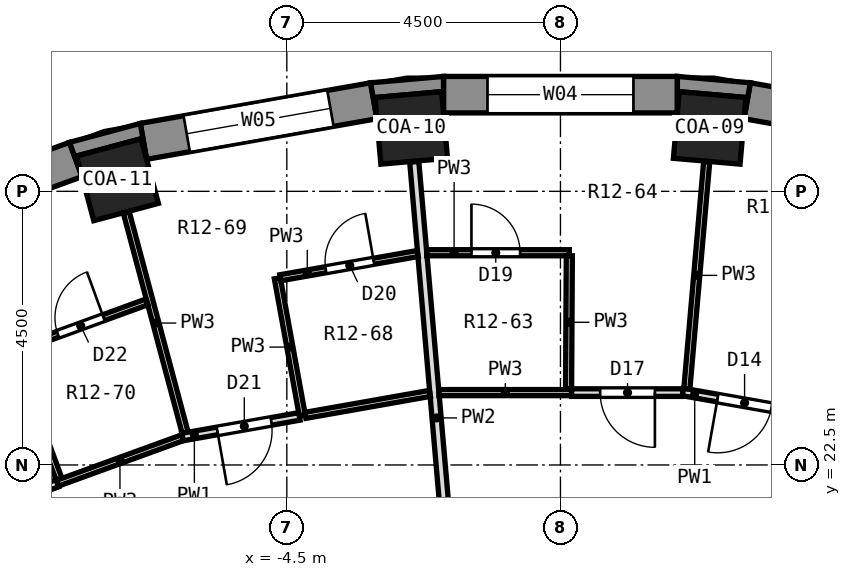
"""IFC4 building model, lengths in metres.
Left out: names, types, materials, properties, quantities, classifications, styles, units other than length and angle.
Written with IfcOpenShell. Run it as: python <this file> out.ifc"""

import sys

from ifc_helpers import new_model, si_unit, direction, frame, frame_2d, origin, origin_2d, place, context, subcontext, project, spatial, polyline, rectangle, outline, extrude, element, fill, save


model = new_model("IFC4")
c1 = context("Model", 3, precision=1e-05, world=origin(), true_north=direction((0.0, 1.0)))
c2 = subcontext(c1, "Body", "Model", "MODEL_VIEW")
j1 = project(units=[si_unit("LENGTHUNIT", "METRE"), si_unit("PLANEANGLEUNIT", "RADIAN")], contexts=[c1])
p1 = place(None, origin())
s1 = spatial("IfcSite", under=j1, at=p1, CompositionType="ELEMENT")
p2 = place(p1, origin())
s2 = spatial("IfcBuilding", under=s1, at=p2, CompositionType="ELEMENT")
p3 = place(p2, frame((0.0, 0.0, 56.0)))
s3 = spatial("IfcBuildingStorey", under=s2, at=p3, CompositionType="ELEMENT", Elevation=56.0)
for number, where, z_axis, x_axis in (
    (1, (2.453, 28.043, 0.0), (0.0, 0.0, 1.0), (0.087, 0.996, 0.0)),
    (2, (-2.453, 28.043, 0.0), (0.0, 0.0, 1.0), (-0.087, 0.996, 0.0)),
    (3, (-7.286, 27.191, 0.0), (0.0, 0.0, 1.0), (-0.259, 0.966, 0.0)),
):
    element("IfcColumn", number, at=place(p3, frame(where, z_axis=z_axis, x_axis=x_axis)), inside=s3, PredefinedType="COLUMN", context=c2, shape_type="SweptSolid", body=[
        extrude(rectangle(XDim=1.1, YDim=1.1, at=origin_2d()), origin(), (0.0, 0.0, 1.0), 3.3),
    ])
p4 = place(p3, frame((6.858, 27.821, 0.0), z_axis=(0.0, 0.0, 1.0), x_axis=(-0.984800809218, 0.173687553279, 0.0)))
e4 = element("IfcWall", 4, at=p4, inside=s3, PredefinedType="SOLIDWALL", context=c2, shape_type="SweptSolid", body=[
    extrude(rectangle(XDim=3.846, YDim=0.6, at=frame_2d((1.923, 0.0))), origin(), (0.0, 0.0, 1.0), 2.75),
])
p5 = place(p4, frame((0.723, 0.0, 0.9)))
e5 = element("IfcOpeningElement", 5, at=p5, cuts=e4, PredefinedType="OPENING", context=c2, shape_type="SweptSolid", body=[
    extrude(rectangle(XDim=2.4, YDim=1.8, at=frame_2d((1.2, 0.9))), frame((0.0, 0.312, 0.0), z_axis=(0.0, -1.0, 0.0), x_axis=(1.0, 0.0, 0.0)), (0.0, 0.0, 1.0), 0.624),
])
p6 = place(p3, frame((1.923, 28.59, 0.0), z_axis=(0.0, 0.0, 1.0), x_axis=(-1.0, 0.0, 0.0)))
e6 = element("IfcWall", 6, at=p6, inside=s3, PredefinedType="SOLIDWALL", context=c2, shape_type="SweptSolid", body=[
    extrude(rectangle(XDim=3.846, YDim=0.6, at=frame_2d((1.923, 0.0))), origin(), (0.0, 0.0, 1.0), 2.75),
])
p7 = place(p6, frame((0.723, 0.0, 0.9)))
e7 = element("IfcOpeningElement", 7, at=p7, cuts=e6, PredefinedType="OPENING", context=c2, shape_type="SweptSolid", body=[
    extrude(rectangle(XDim=2.4, YDim=1.8, at=frame_2d((1.2, 0.9))), frame((0.0, 0.312, 0.0), z_axis=(0.0, -1.0, 0.0), x_axis=(1.0, 0.0, 0.0)), (0.0, 0.0, 1.0), 0.624),
])
p8 = place(p3, frame((-3.071, 28.489, 0.0), z_axis=(0.0, 0.0, 1.0), x_axis=(-0.984800809218, -0.173687553279, 0.0)))
e8 = element("IfcWall", 8, at=p8, inside=s3, PredefinedType="SOLIDWALL", context=c2, shape_type="SweptSolid", body=[
    extrude(rectangle(XDim=3.846, YDim=0.6, at=frame_2d((1.923, 0.0))), origin(), (0.0, 0.0, 1.0), 2.75),
])
p9 = place(p8, frame((0.723, 0.0, 0.9)))
e9 = element("IfcOpeningElement", 9, at=p9, cuts=e8, PredefinedType="OPENING", context=c2, shape_type="SweptSolid", body=[
    extrude(rectangle(XDim=2.4, YDim=1.8, at=frame_2d((1.2, 0.9))), frame((0.0, 0.312, 0.0), z_axis=(0.0, -1.0, 0.0), x_axis=(1.0, 0.0, 0.0)), (0.0, 0.0, 1.0), 0.624),
])
p10 = place(p3, frame((-7.971, 27.523, 0.0), z_axis=(0.0, 0.0, 1.0), x_axis=(-0.939689588564, -0.342028474173, 0.0)))
e10 = element("IfcWall", 10, at=p10, inside=s3, PredefinedType="SOLIDWALL", context=c2, shape_type="SweptSolid", body=[
    extrude(rectangle(XDim=3.846, YDim=0.6, at=frame_2d((1.923, 0.0))), origin(), (0.0, 0.0, 1.0), 2.75),
])
p11 = place(p10, frame((0.723, 0.0, 0.9)))
e11 = element("IfcOpeningElement", 11, at=p11, cuts=e10, PredefinedType="OPENING", context=c2, shape_type="SweptSolid", body=[
    extrude(rectangle(XDim=2.4, YDim=1.8, at=frame_2d((1.2, 0.9))), frame((0.0, 0.312, 0.0), z_axis=(0.0, -1.0, 0.0), x_axis=(1.0, 0.0, 0.0)), (0.0, 0.0, 1.0), 0.624),
])
p12 = place(p3, origin())
e12 = element("IfcWall", 12, at=p12, inside=s3, PredefinedType="SOLIDWALL", context=c2, shape_type="SweptSolid", body=[
    extrude(outline(polyline([(3.123, 28.785), (1.923, 28.89), (1.923, 28.29), (1.954, 28.639), (3.049, 28.543), (3.019, 28.194), (3.123, 28.785)])), origin(), (0.0, 0.0, 1.0), 2.75),
])
p13 = place(p3, origin())
e13 = element("IfcWall", 13, at=p13, inside=s3, PredefinedType="SOLIDWALL", context=c2, shape_type="SweptSolid", body=[
    extrude(outline(polyline([(-1.923, 28.89), (-3.123, 28.785), (-3.019, 28.194), (-3.049, 28.543), (-1.954, 28.639), (-1.923, 28.29), (-1.923, 28.89)])), origin(), (0.0, 0.0, 1.0), 2.75),
])
p14 = place(p3, origin())
e14 = element("IfcWall", 14, at=p14, inside=s3, PredefinedType="SOLIDWALL", context=c2, shape_type="SweptSolid", body=[
    extrude(outline(polyline([(-6.91, 28.117), (-8.074, 27.805), (-7.869, 27.241), (-7.959, 27.58), (-6.897, 27.865), (-6.806, 27.526), (-6.91, 28.117)])), origin(), (0.0, 0.0, 1.0), 2.75),
])
p15 = place(p3, frame((-2.405, 27.485, 0.0), z_axis=(0.0, 0.0, 1.0), x_axis=(0.086942360441, -0.996213343597, 0.0)))
e15 = element("IfcWall", 15, at=p15, inside=s3, PredefinedType="PARTITIONING", context=c2, shape_type="SweptSolid", body=[
    extrude(rectangle(XDim=8.455, YDim=0.15, at=frame_2d((4.228, 0.0))), origin(), (0.0, 0.0, 1.0), 2.75),
])
p16 = place(p3, frame((-4.656, 25.57, 0.0), z_axis=(0.0, 0.0, 1.0), x_axis=(0.179165642613, -0.983818922621, 0.0)))
e16 = element("IfcWall", 16, at=p16, inside=s3, PredefinedType="PARTITIONING", context=c2, shape_type="SweptSolid", body=[
    extrude(rectangle(XDim=2.3, YDim=0.1, at=frame_2d((1.15, 0.0))), origin(), (0.0, 0.0, 1.0), 2.75),
])
p17 = place(p3, frame((-7.139, 26.65, 0.0), z_axis=(0.0, 0.0, 1.0), x_axis=(0.258074907141, -0.966124910301, 0.0)))
e17 = element("IfcWall", 17, at=p17, inside=s3, PredefinedType="PARTITIONING", context=c2, shape_type="SweptSolid", body=[
    extrude(rectangle(XDim=3.76, YDim=0.1, at=frame_2d((1.88, 0.0))), origin(), (0.0, 0.0, 1.0), 2.75),
])
p18 = place(p3, frame((-9.026, 24.372, 0.0), z_axis=(0.0, 0.0, 1.0), x_axis=(0.347445153589, -0.937700306733, 0.0)))
e18 = element("IfcWall", 18, at=p18, inside=s3, PredefinedType="PARTITIONING", context=c2, shape_type="SweptSolid", body=[
    extrude(rectangle(XDim=2.249, YDim=0.1, at=frame_2d((1.125, 0.0))), origin(), (0.0, 0.0, 1.0), 2.75),
])
p19 = place(p3, frame((2.01, 23.701, 0.0), z_axis=(0.0, 0.0, 1.0), x_axis=(0.984788592159, -0.173756809228, 0.0)))
e19 = element("IfcWall", 19, at=p19, inside=s3, PredefinedType="PARTITIONING", context=c2, shape_type="SweptSolid", body=[
    extrude(rectangle(XDim=1.953, YDim=0.125, at=frame_2d((0.977, 0.0))), origin(), (0.0, 0.0, 1.0), 2.75),
])
p20 = place(p19, frame((0.583, 0.0, 0.0)))
e20 = element("IfcOpeningElement", 20, at=p20, cuts=e19, PredefinedType="OPENING", context=c2, shape_type="SweptSolid", body=[
    extrude(rectangle(XDim=0.9, YDim=2.1, at=frame_2d((0.45, 1.05))), frame((0.0, 0.074, 0.0), z_axis=(0.0, -1.0, 0.0), x_axis=(1.0, 0.0, 0.0)), (0.0, 0.0, 1.0), 0.149),
])
p21 = place(p3, frame((-1.998, 23.69, 0.0), z_axis=(0.0, 0.0, 1.0), x_axis=(1.0, 0.0, 0.0)))
e21 = element("IfcWall", 21, at=p21, inside=s3, PredefinedType="PARTITIONING", context=c2, shape_type="SweptSolid", body=[
    extrude(rectangle(XDim=2.181, YDim=0.1, at=frame_2d((1.091, 0.0))), origin(), (0.0, 0.0, 1.0), 2.75),
])
p22 = place(p3, frame((0.183, 23.69, 0.0), z_axis=(0.0, 0.0, 1.0), x_axis=(1.0, 0.0, 0.0)))
e22 = element("IfcWall", 22, at=p22, inside=s3, PredefinedType="PARTITIONING", context=c2, shape_type="SweptSolid", body=[
    extrude(rectangle(XDim=1.827, YDim=0.125, at=frame_2d((0.914, 0.0))), origin(), (0.0, 0.0, 1.0), 2.75),
])
p23 = place(p22, frame((0.47, 0.0, 0.0)))
e23 = element("IfcOpeningElement", 23, at=p23, cuts=e22, PredefinedType="OPENING", context=c2, shape_type="SweptSolid", body=[
    extrude(rectangle(XDim=0.9, YDim=2.1, at=frame_2d((0.45, 1.05))), frame((0.0, 0.074, 0.0), z_axis=(0.0, -1.0, 0.0), x_axis=(1.0, 0.0, 0.0)), (0.0, 0.0, 1.0), 0.149),
])
p24 = place(p3, frame((-2.199, 25.99, 0.0), z_axis=(0.0, 0.0, 1.0), x_axis=(1.0, 0.0, 0.0)))
e24 = element("IfcWall", 24, at=p24, inside=s3, PredefinedType="PARTITIONING", context=c2, shape_type="SweptSolid", body=[
    extrude(rectangle(XDim=2.345, YDim=0.1, at=frame_2d((1.172, 0.0))), origin(), (0.0, 0.0, 1.0), 2.75),
])
p25 = place(p24, frame((0.735, 0.0, 0.0)))
e25 = element("IfcOpeningElement", 25, at=p25, cuts=e24, PredefinedType="OPENING", context=c2, shape_type="SweptSolid", body=[
    extrude(rectangle(XDim=0.8, YDim=2.1, at=frame_2d((0.4, 1.05))), frame((0.0, 0.062, 0.0), z_axis=(0.0, -1.0, 0.0), x_axis=(1.0, 0.0, 0.0)), (0.0, 0.0, 1.0), 0.124),
])
p26 = place(p3, frame((-4.195, 23.316, 0.0), z_axis=(0.0, 0.0, 1.0), x_axis=(0.984788286148, 0.173758543574, 0.0)))
e26 = element("IfcWall", 26, at=p26, inside=s3, PredefinedType="PARTITIONING", context=c2, shape_type="SweptSolid", body=[
    extrude(rectangle(XDim=2.08, YDim=0.1, at=frame_2d((1.04, 0.0))), origin(), (0.0, 0.0, 1.0), 2.75),
])
p27 = place(p3, frame((-6.218, 22.959, 0.0), z_axis=(0.0, 0.0, 1.0), x_axis=(0.984803677322, 0.173671290469, 0.0)))
e27 = element("IfcWall", 27, at=p27, inside=s3, PredefinedType="PARTITIONING", context=c2, shape_type="SweptSolid", body=[
    extrude(rectangle(XDim=1.954, YDim=0.125, at=frame_2d((0.977, 0.0))), origin(), (0.0, 0.0, 1.0), 2.75),
])
p28 = place(p27, frame((0.584, 0.0, 0.0)))
e28 = element("IfcOpeningElement", 28, at=p28, cuts=e27, PredefinedType="OPENING", context=c2, shape_type="SweptSolid", body=[
    extrude(rectangle(XDim=0.9, YDim=2.1, at=frame_2d((0.45, 1.05))), frame((0.0, 0.074, 0.0), z_axis=(0.0, -1.0, 0.0), x_axis=(1.0, 0.0, 0.0)), (0.0, 0.0, 1.0), 0.149),
])
p29 = place(p3, frame((-4.607, 25.579, 0.0), z_axis=(0.0, 0.0, 1.0), x_axis=(0.984796414822, 0.173712467465, 0.0)))
e29 = element("IfcWall", 29, at=p29, inside=s3, PredefinedType="PARTITIONING", context=c2, shape_type="SweptSolid", body=[
    extrude(rectangle(XDim=2.294, YDim=0.1, at=frame_2d((1.147, 0.0))), origin(), (0.0, 0.0, 1.0), 2.75),
])
p30 = place(p29, frame((0.76, 0.0, 0.0)))
e30 = element("IfcOpeningElement", 30, at=p30, cuts=e29, PredefinedType="OPENING", context=c2, shape_type="SweptSolid", body=[
    extrude(rectangle(XDim=0.8, YDim=2.1, at=frame_2d((0.4, 1.05))), frame((0.0, 0.062, 0.0), z_axis=(0.0, -1.0, 0.0), x_axis=(1.0, 0.0, 0.0)), (0.0, 0.0, 1.0), 0.124),
])
p31 = place(p3, frame((-8.274, 22.199, 0.0), z_axis=(0.0, 0.0, 1.0), x_axis=(0.939712116987, 0.341966573204, 0.0)))
e31 = element("IfcWall", 31, at=p31, inside=s3, PredefinedType="PARTITIONING", context=c2, shape_type="SweptSolid", body=[
    extrude(rectangle(XDim=2.192, YDim=0.1, at=frame_2d((1.096, 0.0))), origin(), (0.0, 0.0, 1.0), 2.75),
])
p32 = place(p3, frame((-10.11, 21.53, 0.0), z_axis=(0.0, 0.0, 1.0), x_axis=(0.939599898996, 0.342274786986, 0.0)))
e32 = element("IfcWall", 32, at=p32, inside=s3, PredefinedType="PARTITIONING", context=c2, shape_type="SweptSolid", body=[
    extrude(rectangle(XDim=1.954, YDim=0.125, at=frame_2d((0.977, 0.0))), origin(), (0.0, 0.0, 1.0), 2.75),
])
p33 = place(p32, frame((0.583, 0.0, 0.0)))
e33 = element("IfcOpeningElement", 33, at=p33, cuts=e32, PredefinedType="OPENING", context=c2, shape_type="SweptSolid", body=[
    extrude(rectangle(XDim=0.9, YDim=2.1, at=frame_2d((0.45, 1.05))), frame((0.0, 0.074, 0.0), z_axis=(0.0, -1.0, 0.0), x_axis=(1.0, 0.0, 0.0)), (0.0, 0.0, 1.0), 0.149),
])
p34 = place(p3, frame((-8.979, 24.389, 0.0), z_axis=(0.0, 0.0, 1.0), x_axis=(0.93967659433, 0.342064172443, 0.0)))
e34 = element("IfcWall", 34, at=p34, inside=s3, PredefinedType="PARTITIONING", context=c2, shape_type="SweptSolid", body=[
    extrude(rectangle(XDim=2.32, YDim=0.1, at=frame_2d((1.16, 0.0))), origin(), (0.0, 0.0, 1.0), 2.75),
])
p35 = place(p34, frame((0.76, 0.0, 0.0)))
e35 = element("IfcOpeningElement", 35, at=p35, cuts=e34, PredefinedType="OPENING", context=c2, shape_type="SweptSolid", body=[
    extrude(rectangle(XDim=0.8, YDim=2.1, at=frame_2d((0.4, 1.05))), frame((0.0, 0.062, 0.0), z_axis=(0.0, -1.0, 0.0), x_axis=(1.0, 0.0, 0.0)), (0.0, 0.0, 1.0), 0.124),
])
p36 = place(p3, frame((2.078, 23.752, 0.0), z_axis=(0.0, 0.0, 1.0), x_axis=(0.087045714137, 0.996204318225, 0.0)))
e36 = element("IfcWall", 36, at=p36, inside=s3, PredefinedType="PARTITIONING", context=c2, shape_type="SweptSolid", body=[
    extrude(rectangle(XDim=3.747, YDim=0.1, at=frame_2d((1.874, 0.0))), origin(), (0.0, 0.0, 1.0), 2.75),
])
p37 = place(p3, frame((0.133, 23.752, 0.0), z_axis=(0.0, 0.0, 1.0), x_axis=(0.005691872083, 0.999983801165, 0.0)))
e37 = element("IfcWall", 37, at=p37, inside=s3, PredefinedType="PARTITIONING", context=c2, shape_type="SweptSolid", body=[
    extrude(rectangle(XDim=2.188, YDim=0.1, at=frame_2d((1.094, 0.0))), origin(), (0.0, 0.0, 1.0), 2.75),
])
p38 = place(p7, origin())
e38 = element("IfcWindow", 38, at=p38, inside=s3, PartitioningType="SINGLE_PANEL", PredefinedType="WINDOW", context=c2, shape_type="SweptSolid", body=[
    extrude(rectangle(XDim=2.4, YDim=1.8, at=frame_2d((1.2, 0.9))), frame((0.0, 0.18, 0.0), z_axis=(0.0, -1.0, 0.0), x_axis=(1.0, 0.0, 0.0)), (0.0, 0.0, 1.0), 0.06),
])
fill(e7, e38)
p39 = place(p9, origin())
e39 = element("IfcWindow", 39, at=p39, inside=s3, PartitioningType="SINGLE_PANEL", PredefinedType="WINDOW", context=c2, shape_type="SweptSolid", body=[
    extrude(rectangle(XDim=2.4, YDim=1.8, at=frame_2d((1.2, 0.9))), frame((0.0, 0.18, 0.0), z_axis=(0.0, -1.0, 0.0), x_axis=(1.0, 0.0, 0.0)), (0.0, 0.0, 1.0), 0.06),
])
fill(e9, e39)
p40 = place(p20, frame((0.9, 0.0, 0.0), z_axis=(0.0, 0.0, 1.0), x_axis=(-1.0, 0.0, 0.0)))
e40 = element("IfcDoor", 40, at=p40, inside=s3, OperationType="SINGLE_SWING_RIGHT", PredefinedType="DOOR", context=c2, shape_type="SweptSolid", body=[
    extrude(rectangle(XDim=0.9, YDim=2.1, at=frame_2d((0.45, 1.05))), frame((0.0, 0.025, 0.0), z_axis=(0.0, -1.0, 0.0), x_axis=(1.0, 0.0, 0.0)), (0.0, 0.0, 1.0), 0.05),
])
fill(e20, e40)
p41 = place(p23, frame((0.9, 0.0, 0.0), z_axis=(0.0, 0.0, 1.0), x_axis=(-1.0, 0.0, 0.0)))
e41 = element("IfcDoor", 41, at=p41, inside=s3, OperationType="SINGLE_SWING_LEFT", PredefinedType="DOOR", context=c2, shape_type="SweptSolid", body=[
    extrude(rectangle(XDim=0.9, YDim=2.1, at=frame_2d((0.45, 1.05))), frame((0.0, 0.025, 0.0), z_axis=(0.0, -1.0, 0.0), x_axis=(1.0, 0.0, 0.0)), (0.0, 0.0, 1.0), 0.05),
])
fill(e23, e41)
p42 = place(p25, origin())
e42 = element("IfcDoor", 42, at=p42, inside=s3, OperationType="SINGLE_SWING_LEFT", PredefinedType="DOOR", context=c2, shape_type="SweptSolid", body=[
    extrude(rectangle(XDim=0.8, YDim=2.1, at=frame_2d((0.4, 1.05))), frame((0.0, 0.025, 0.0), z_axis=(0.0, -1.0, 0.0), x_axis=(1.0, 0.0, 0.0)), (0.0, 0.0, 1.0), 0.05),
])
fill(e25, e42)
p43 = place(p30, origin())
e43 = element("IfcDoor", 43, at=p43, inside=s3, OperationType="SINGLE_SWING_RIGHT", PredefinedType="DOOR", context=c2, shape_type="SweptSolid", body=[
    extrude(rectangle(XDim=0.8, YDim=2.1, at=frame_2d((0.4, 1.05))), frame((0.0, 0.025, 0.0), z_axis=(0.0, -1.0, 0.0), x_axis=(1.0, 0.0, 0.0)), (0.0, 0.0, 1.0), 0.05),
])
fill(e30, e43)
p44 = place(p28, frame((0.9, 0.0, 0.0), z_axis=(0.0, 0.0, 1.0), x_axis=(-1.0, 0.0, 0.0)))
e44 = element("IfcDoor", 44, at=p44, inside=s3, OperationType="SINGLE_SWING_RIGHT", PredefinedType="DOOR", context=c2, shape_type="SweptSolid", body=[
    extrude(rectangle(XDim=0.9, YDim=2.1, at=frame_2d((0.45, 1.05))), frame((0.0, 0.025, 0.0), z_axis=(0.0, -1.0, 0.0), x_axis=(1.0, 0.0, 0.0)), (0.0, 0.0, 1.0), 0.05),
])
fill(e28, e44)
p45 = place(p35, origin())
e45 = element("IfcDoor", 45, at=p45, inside=s3, OperationType="SINGLE_SWING_RIGHT", PredefinedType="DOOR", context=c2, shape_type="SweptSolid", body=[
    extrude(rectangle(XDim=0.8, YDim=2.1, at=frame_2d((0.4, 1.05))), frame((0.0, 0.025, 0.0), z_axis=(0.0, -1.0, 0.0), x_axis=(1.0, 0.0, 0.0)), (0.0, 0.0, 1.0), 0.05),
])
fill(e35, e45)
save(model, sys.argv[1])
